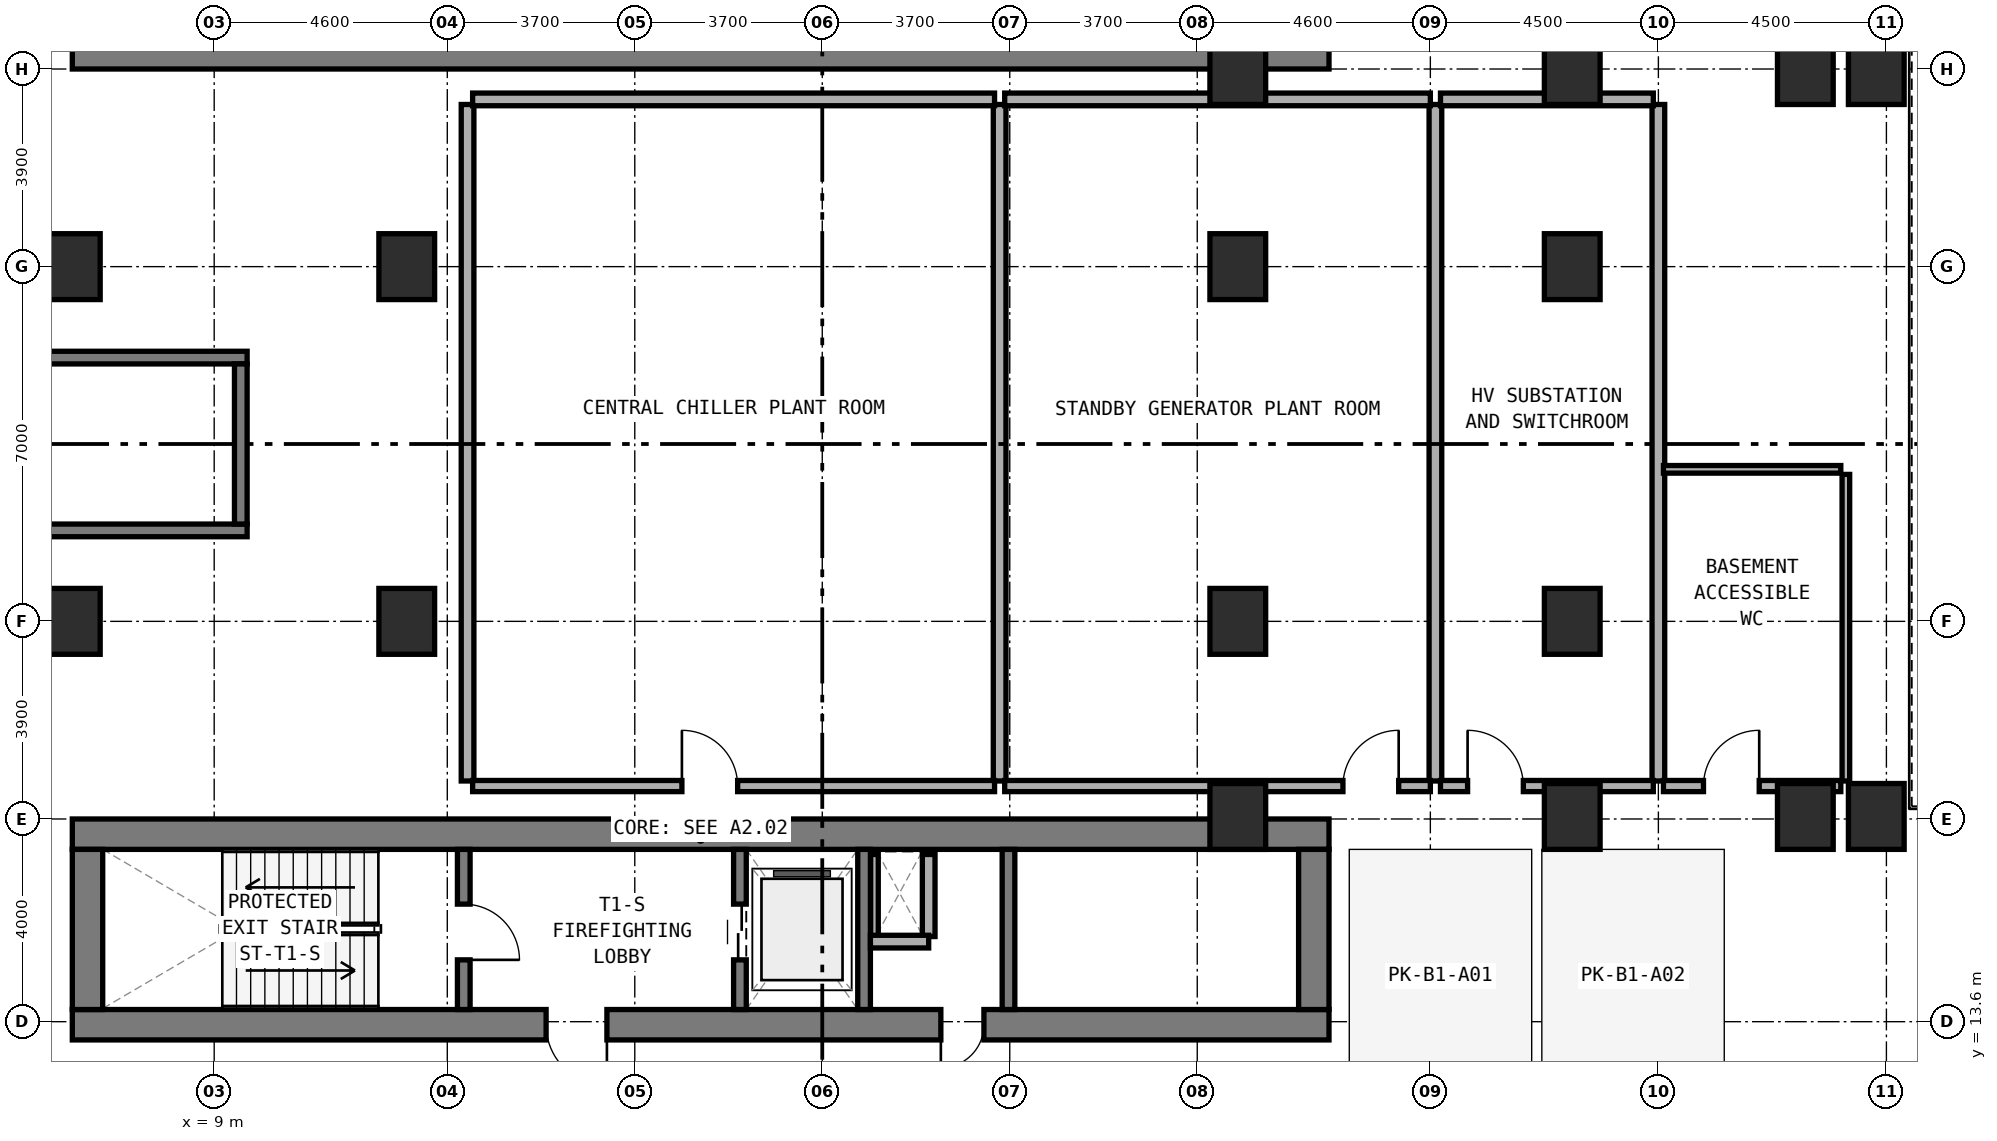
"""IFC4 building model, lengths in metres.
Left out: names, types, materials, properties, quantities, classifications, styles, units other than length and angle.
Written with IfcOpenShell. Run it as: python <this file> out.ifc"""

import sys

from ifc_helpers import new_model, si_unit, direction, frame, frame_2d, origin, origin_2d, place, context, subcontext, project, spatial, rectangle, extrude, element, fill, save


model = new_model("IFC4")
c1 = context("Model", 3, precision=1e-05, world=origin(), true_north=direction((0.0, 1.0)))
c2 = subcontext(c1, "Body", "Model", "MODEL_VIEW")
j1 = project(units=[si_unit("LENGTHUNIT", "METRE"), si_unit("PLANEANGLEUNIT", "RADIAN")], contexts=[c1])
p1 = place(None, origin())
s1 = spatial("IfcSite", under=j1, at=p1, CompositionType="ELEMENT")
p2 = place(p1, origin())
s2 = spatial("IfcBuilding", under=s1, at=p2, CompositionType="ELEMENT")
p3 = place(p2, frame((0.0, 0.0, -4.2)))
s3 = spatial("IfcBuildingStorey", under=s2, at=p3, CompositionType="ELEMENT", Elevation=-4.2)
p4 = place(p3, frame((6.2, 32.7, 0.0), z_axis=(0.0, 0.0, 1.0), x_axis=(1.0, 0.0, 0.0)))
e1 = element("IfcWall", 1, at=p4, inside=s3, PredefinedType="SHEAR", context=c2, shape_type="SweptSolid", body=[
    extrude(rectangle(XDim=24.8, YDim=0.6, at=frame_2d((12.4, 0.0))), origin(), (0.0, 0.0, 1.0), 4.2),
])
p5 = place(p3, frame((6.2, 13.54, 0.0), z_axis=(0.0, 0.0, 1.0), x_axis=(1.0, 0.0, 0.0)))
e2 = element("IfcWall", 2, at=p5, inside=s3, PredefinedType="SHEAR", context=c2, shape_type="SweptSolid", body=[
    extrude(rectangle(XDim=24.8, YDim=0.6, at=frame_2d((12.4, 0.0))), origin(), (0.0, 0.0, 1.0), 4.2),
])
p6 = place(p5, frame((9.35, 0.0, 0.0)))
e3 = element("IfcOpeningElement", 3, at=p6, cuts=e2, PredefinedType="OPENING", context=c2, shape_type="SweptSolid", body=[
    extrude(rectangle(XDim=1.2, YDim=2.15, at=frame_2d((0.6, 1.075))), frame((0.0, 0.31, 0.0), z_axis=(0.0, -1.0, 0.0), x_axis=(1.0, 0.0, 0.0)), (0.0, 0.0, 1.0), 0.62),
])
p7 = place(p5, frame((17.14, 0.0, 0.0)))
e4 = element("IfcOpeningElement", 4, at=p7, cuts=e2, PredefinedType="OPENING", context=c2, shape_type="SweptSolid", body=[
    extrude(rectangle(XDim=0.85, YDim=2.1, at=frame_2d((0.425, 1.05))), frame((0.0, 0.31, 0.0), z_axis=(0.0, -1.0, 0.0), x_axis=(1.0, 0.0, 0.0)), (0.0, 0.0, 1.0), 0.62),
])
p8 = place(p3, frame((6.2, 17.3, 0.0), z_axis=(0.0, 0.0, 1.0), x_axis=(1.0, 0.0, 0.0)))
e5 = element("IfcWall", 5, at=p8, inside=s3, PredefinedType="SHEAR", context=c2, shape_type="SweptSolid", body=[
    extrude(rectangle(XDim=24.8, YDim=0.6, at=frame_2d((12.4, 0.0))), origin(), (0.0, 0.0, 1.0), 4.2),
])
for number, where, z_axis, x_axis in (
    (6, (6.5, 13.84, 0.0), (0.0, 0.0, 1.0), (0.0, 1.0, 0.0)),
    (7, (30.7, 13.84, 0.0), (0.0, 0.0, 1.0), (0.0, 1.0, 0.0)),
):
    element("IfcWall", number, at=place(p3, frame(where, z_axis=z_axis, x_axis=x_axis)), inside=s3, PredefinedType="SHEAR", context=c2, shape_type="SweptSolid", body=[
        extrude(rectangle(XDim=3.16, YDim=0.6, at=frame_2d((1.58, 0.0))), origin(), (0.0, 0.0, 1.0), 4.2),
    ])
p9 = place(p3, frame((13.925, 13.84, 0.0), z_axis=(0.0, 0.0, 1.0), x_axis=(0.0, 1.0, 0.0)))
e8 = element("IfcWall", 8, at=p9, inside=s3, PredefinedType="STANDARD", context=c2, shape_type="SweptSolid", body=[
    extrude(rectangle(XDim=3.16, YDim=0.25, at=frame_2d((1.58, 0.0))), origin(), (0.0, 0.0, 1.0), 3.85),
])
p10 = place(p9, frame((0.98, 0.0, 0.0)))
e9 = element("IfcOpeningElement", 9, at=p10, cuts=e8, PredefinedType="OPENING", context=c2, shape_type="SweptSolid", body=[
    extrude(rectangle(XDim=1.1, YDim=2.15, at=frame_2d((0.55, 1.075))), frame((0.0, 0.135, 0.0), z_axis=(0.0, -1.0, 0.0), x_axis=(1.0, 0.0, 0.0)), (0.0, 0.0, 1.0), 0.27),
])
p11 = place(p3, frame((19.375, 13.84, 0.0), z_axis=(0.0, 0.0, 1.0), x_axis=(0.0, 1.0, 0.0)))
e10 = element("IfcWall", 10, at=p11, inside=s3, PredefinedType="STANDARD", context=c2, shape_type="SweptSolid", body=[
    extrude(rectangle(XDim=3.16, YDim=0.25, at=frame_2d((1.58, 0.0))), origin(), (0.0, 0.0, 1.0), 3.85),
])
p12 = place(p11, frame((0.98, 0.0, 0.0)))
e11 = element("IfcOpeningElement", 11, at=p12, cuts=e10, PredefinedType="OPENING", context=c2, shape_type="SweptSolid", body=[
    extrude(rectangle(XDim=1.1, YDim=2.15, at=frame_2d((0.55, 1.075))), frame((0.0, 0.135, 0.0), z_axis=(0.0, -1.0, 0.0), x_axis=(1.0, 0.0, 0.0)), (0.0, 0.0, 1.0), 0.27),
])
for number, where, z_axis, x_axis in (
    (12, (21.825, 13.84, 0.0), (0.0, 0.0, 1.0), (0.0, 1.0, 0.0)),
    (13, (24.675, 13.84, 0.0), (0.0, 0.0, 1.0), (0.0, 1.0, 0.0)),
):
    element("IfcWall", number, at=place(p3, frame(where, z_axis=z_axis, x_axis=x_axis)), inside=s3, PredefinedType="STANDARD", context=c2, shape_type="SweptSolid", body=[
        extrude(rectangle(XDim=3.16, YDim=0.25, at=frame_2d((1.58, 0.0))), origin(), (0.0, 0.0, 1.0), 3.85),
    ])
for number, where, z_axis, x_axis in (
    (14, (2.15, 23.295, 0.0), (0.0, 0.0, 1.0), (1.0, 0.0, 0.0)),
    (15, (2.15, 26.705, 0.0), (0.0, 0.0, 1.0), (1.0, 0.0, 0.0)),
):
    element("IfcWall", number, at=place(p3, frame(where, z_axis=z_axis, x_axis=x_axis)), inside=s3, PredefinedType="STANDARD", context=c2, shape_type="SweptSolid", body=[
        extrude(rectangle(XDim=7.5, YDim=0.25, at=frame_2d((3.75, 0.0))), origin(), (0.0, 0.0, 1.0), 4.2),
    ])
p13 = place(p3, frame((9.525, 23.42, 0.0), z_axis=(0.0, 0.0, 1.0), x_axis=(0.0, 1.0, 0.0)))
e16 = element("IfcWall", 16, at=p13, inside=s3, PredefinedType="STANDARD", context=c2, shape_type="SweptSolid", body=[
    extrude(rectangle(XDim=3.16, YDim=0.25, at=frame_2d((1.58, 0.0))), origin(), (0.0, 0.0, 1.0), 4.2),
])
for number, where, z_axis, x_axis in (
    (17, (6.2, 21.5, 0.0), (0.0, 0.0, 1.0), (1.0, 0.0, 0.0)),
    (18, (6.2, 28.5, 0.0), (0.0, 0.0, 1.0), (1.0, 0.0, 0.0)),
    (19, (35.8, 21.5, 0.0), (0.0, 0.0, 1.0), (1.0, 0.0, 0.0)),
    (20, (35.8, 28.5, 0.0), (0.0, 0.0, 1.0), (1.0, 0.0, 0.0)),
    (21, (35.8, 17.65, 0.0), (0.0, 0.0, 1.0), (1.0, 0.0, 0.0)),
    (22, (35.8, 32.35, 0.0), (0.0, 0.0, 1.0), (1.0, 0.0, 0.0)),
    (23, (12.8, 21.5, 0.0), (0.0, 0.0, 1.0), (1.0, 0.0, 0.0)),
    (24, (12.8, 28.5, 0.0), (0.0, 0.0, 1.0), (1.0, 0.0, 0.0)),
    (25, (29.2, 17.65, 0.0), (0.0, 0.0, 1.0), (1.0, 0.0, 0.0)),
    (26, (29.2, 32.35, 0.0), (0.0, 0.0, 1.0), (1.0, 0.0, 0.0)),
    (27, (29.2, 21.5, 0.0), (0.0, 0.0, 1.0), (1.0, 0.0, 0.0)),
    (28, (29.2, 28.5, 0.0), (0.0, 0.0, 1.0), (1.0, 0.0, 0.0)),
    (29, (40.4, 17.65, 0.0), (0.0, 0.0, 1.0), (1.0, 0.0, 0.0)),
    (30, (40.4, 32.35, 0.0), (0.0, 0.0, 1.0), (1.0, 0.0, 0.0)),
    (31, (41.8, 17.65, 0.0), (0.0, 0.0, 1.0), (1.0, 0.0, 0.0)),
    (32, (41.8, 32.35, 0.0), (0.0, 0.0, 1.0), (1.0, 0.0, 0.0)),
):
    element("IfcColumn", number, at=place(p3, frame(where, z_axis=z_axis, x_axis=x_axis)), inside=s3, PredefinedType="COLUMN", context=c2, shape_type="SweptSolid", body=[
        extrude(rectangle(XDim=1.1, YDim=1.3, at=origin_2d()), origin(), (0.0, 0.0, 1.0), 4.2),
    ])
p14 = place(p3, frame((22.03, 15.28, 0.0), z_axis=(0.0, 0.0, 1.0), x_axis=(0.0, 1.0, 0.0)))
e33 = element("IfcWall", 33, at=p14, inside=s3, PredefinedType="PARTITIONING", context=c2, shape_type="SweptSolid", body=[
    extrude(rectangle(XDim=1.62, YDim=0.15, at=frame_2d((0.81, 0.0))), origin(), (0.0, 0.0, 1.0), 3.85),
])
p15 = place(p3, frame((23.1, 15.28, 0.0), z_axis=(0.0, 0.0, 1.0), x_axis=(0.0, 1.0, 0.0)))
e34 = element("IfcWall", 34, at=p15, inside=s3, PredefinedType="SOLIDWALL", context=c2, shape_type="SweptSolid", body=[
    extrude(rectangle(XDim=1.62, YDim=0.25, at=frame_2d((0.81, 0.0))), origin(), (0.0, 0.0, 1.0), 3.85),
])
p16 = place(p3, frame((21.95, 15.18, 0.0), z_axis=(0.0, 0.0, 1.0), x_axis=(1.0, 0.0, 0.0)))
e35 = element("IfcWall", 35, at=p16, inside=s3, PredefinedType="SOLIDWALL", context=c2, shape_type="SweptSolid", body=[
    extrude(rectangle(XDim=1.15, YDim=0.25, at=frame_2d((0.575, 0.0))), origin(), (0.0, 0.0, 1.0), 3.85),
])
for number, where, z_axis, x_axis in (
    (36, (14.0, 18.35, 0.0), (0.0, 0.0, 1.0), (0.0, 1.0, 0.0)),
    (37, (24.5, 18.35, 0.0), (0.0, 0.0, 1.0), (0.0, 1.0, 0.0)),
):
    element("IfcWall", number, at=place(p3, frame(where, z_axis=z_axis, x_axis=x_axis)), inside=s3, PredefinedType="SOLIDWALL", context=c2, shape_type="SweptSolid", body=[
        extrude(rectangle(XDim=13.35, YDim=0.25, at=frame_2d((6.675, 0.0))), origin(), (0.0, 0.0, 1.0), 3.85),
    ])
p17 = place(p3, frame((14.1, 31.8, 0.0), z_axis=(0.0, 0.0, 1.0), x_axis=(1.0, 0.0, 0.0)))
e38 = element("IfcWall", 38, at=p17, inside=s3, PredefinedType="SOLIDWALL", context=c2, shape_type="SweptSolid", body=[
    extrude(rectangle(XDim=10.3, YDim=0.25, at=frame_2d((5.15, 0.0))), origin(), (0.0, 0.0, 1.0), 3.85),
])
p18 = place(p3, frame((14.1, 18.25, 0.0), z_axis=(0.0, 0.0, 1.0), x_axis=(1.0, 0.0, 0.0)))
e39 = element("IfcWall", 39, at=p18, inside=s3, PredefinedType="SOLIDWALL", context=c2, shape_type="SweptSolid", body=[
    extrude(rectangle(XDim=10.3, YDim=0.22, at=frame_2d((5.15, 0.0))), origin(), (0.0, 0.0, 1.0), 3.85),
])
p19 = place(p18, frame((4.13, 0.0, 0.0)))
e40 = element("IfcOpeningElement", 40, at=p19, cuts=e39, PredefinedType="OPENING", context=c2, shape_type="SweptSolid", body=[
    extrude(rectangle(XDim=1.1, YDim=2.1, at=frame_2d((0.55, 1.05))), frame((0.0, 0.12, 0.0), z_axis=(0.0, -1.0, 0.0), x_axis=(1.0, 0.0, 0.0)), (0.0, 0.0, 1.0), 0.24),
])
p20 = place(p3, frame((33.1, 18.35, 0.0), z_axis=(0.0, 0.0, 1.0), x_axis=(0.0, 1.0, 0.0)))
e41 = element("IfcWall", 41, at=p20, inside=s3, PredefinedType="SOLIDWALL", context=c2, shape_type="SweptSolid", body=[
    extrude(rectangle(XDim=13.35, YDim=0.25, at=frame_2d((6.675, 0.0))), origin(), (0.0, 0.0, 1.0), 3.85),
])
p21 = place(p3, frame((24.6, 31.8, 0.0), z_axis=(0.0, 0.0, 1.0), x_axis=(1.0, 0.0, 0.0)))
e42 = element("IfcWall", 42, at=p21, inside=s3, PredefinedType="SOLIDWALL", context=c2, shape_type="SweptSolid", body=[
    extrude(rectangle(XDim=8.4, YDim=0.25, at=frame_2d((4.2, 0.0))), origin(), (0.0, 0.0, 1.0), 3.125),
])
p22 = place(p3, frame((24.6, 18.25, 0.0), z_axis=(0.0, 0.0, 1.0), x_axis=(1.0, 0.0, 0.0)))
e43 = element("IfcWall", 43, at=p22, inside=s3, PredefinedType="SOLIDWALL", context=c2, shape_type="SweptSolid", body=[
    extrude(rectangle(XDim=8.4, YDim=0.22, at=frame_2d((4.2, 0.0))), origin(), (0.0, 0.0, 1.0), 3.125),
])
p23 = place(p22, frame((6.675, 0.0, 0.0)))
e44 = element("IfcOpeningElement", 44, at=p23, cuts=e43, PredefinedType="OPENING", context=c2, shape_type="SweptSolid", body=[
    extrude(rectangle(XDim=1.1, YDim=2.1, at=frame_2d((0.55, 1.05))), frame((0.0, 0.12, 0.0), z_axis=(0.0, -1.0, 0.0), x_axis=(1.0, 0.0, 0.0)), (0.0, 0.0, 1.0), 0.24),
])
p24 = place(p3, frame((37.5, 18.35, 0.0), z_axis=(0.0, 0.0, 1.0), x_axis=(0.0, 1.0, 0.0)))
e45 = element("IfcWall", 45, at=p24, inside=s3, PredefinedType="SOLIDWALL", context=c2, shape_type="SweptSolid", body=[
    extrude(rectangle(XDim=13.35, YDim=0.25, at=frame_2d((6.675, 0.0))), origin(), (0.0, 0.0, 1.0), 3.85),
])
p25 = place(p3, frame((33.2, 31.8, 0.0), z_axis=(0.0, 0.0, 1.0), x_axis=(1.0, 0.0, 0.0)))
e46 = element("IfcWall", 46, at=p25, inside=s3, PredefinedType="SOLIDWALL", context=c2, shape_type="SweptSolid", body=[
    extrude(rectangle(XDim=4.2, YDim=0.25, at=frame_2d((2.1, 0.0))), origin(), (0.0, 0.0, 1.0), 3.375),
])
p26 = place(p3, frame((33.2, 18.25, 0.0), z_axis=(0.0, 0.0, 1.0), x_axis=(1.0, 0.0, 0.0)))
e47 = element("IfcWall", 47, at=p26, inside=s3, PredefinedType="SOLIDWALL", context=c2, shape_type="SweptSolid", body=[
    extrude(rectangle(XDim=4.2, YDim=0.22, at=frame_2d((2.1, 0.0))), origin(), (0.0, 0.0, 1.0), 3.375),
])
p27 = place(p26, frame((0.535, 0.0, 0.0)))
e48 = element("IfcOpeningElement", 48, at=p27, cuts=e47, PredefinedType="OPENING", context=c2, shape_type="SweptSolid", body=[
    extrude(rectangle(XDim=1.1, YDim=2.1, at=frame_2d((0.55, 1.05))), frame((0.0, 0.12, 0.0), z_axis=(0.0, -1.0, 0.0), x_axis=(1.0, 0.0, 0.0)), (0.0, 0.0, 1.0), 0.24),
])
p28 = place(p3, frame((41.2, 18.35, 0.0), z_axis=(0.0, 0.0, 1.0), x_axis=(0.0, 1.0, 0.0)))
e49 = element("IfcWall", 49, at=p28, inside=s3, PredefinedType="PARTITIONING", context=c2, shape_type="SweptSolid", body=[
    extrude(rectangle(XDim=6.05, YDim=0.15, at=frame_2d((3.025, 0.0))), origin(), (0.0, 0.0, 1.0), 3.85),
])
p29 = place(p3, frame((37.6, 24.5, 0.0), z_axis=(0.0, 0.0, 1.0), x_axis=(1.0, 0.0, 0.0)))
e50 = element("IfcWall", 50, at=p29, inside=s3, PredefinedType="PARTITIONING", context=c2, shape_type="SweptSolid", body=[
    extrude(rectangle(XDim=3.5, YDim=0.15, at=frame_2d((1.75, 0.0))), origin(), (0.0, 0.0, 1.0), 3.125),
])
p30 = place(p3, frame((37.6, 18.25, 0.0), z_axis=(0.0, 0.0, 1.0), x_axis=(1.0, 0.0, 0.0)))
e51 = element("IfcWall", 51, at=p30, inside=s3, PredefinedType="SOLIDWALL", context=c2, shape_type="SweptSolid", body=[
    extrude(rectangle(XDim=3.5, YDim=0.22, at=frame_2d((1.75, 0.0))), origin(), (0.0, 0.0, 1.0), 3.125),
])
p31 = place(p30, frame((0.79, 0.0, 0.0)))
e52 = element("IfcOpeningElement", 52, at=p31, cuts=e51, PredefinedType="OPENING", context=c2, shape_type="SweptSolid", body=[
    extrude(rectangle(XDim=1.1, YDim=2.1, at=frame_2d((0.55, 1.05))), frame((0.0, 0.12, 0.0), z_axis=(0.0, -1.0, 0.0), x_axis=(1.0, 0.0, 0.0)), (0.0, 0.0, 1.0), 0.24),
])
p32 = place(p10, frame((1.1, 0.0, 0.0), z_axis=(0.0, 0.0, 1.0), x_axis=(-1.0, 0.0, 0.0)))
e53 = element("IfcDoor", 53, at=p32, inside=s3, OperationType="SINGLE_SWING_RIGHT", PredefinedType="DOOR", context=c2, shape_type="SweptSolid", body=[
    extrude(rectangle(XDim=1.1, YDim=2.15, at=frame_2d((0.55, 1.075))), frame((0.0, 0.025, 0.0), z_axis=(0.0, -1.0, 0.0), x_axis=(1.0, 0.0, 0.0)), (0.0, 0.0, 1.0), 0.05),
])
fill(e9, e53)
p33 = place(p6, frame((1.2, 0.0, 0.0), z_axis=(0.0, 0.0, 1.0), x_axis=(-1.0, 0.0, 0.0)))
e54 = element("IfcDoor", 54, at=p33, inside=s3, OperationType="SINGLE_SWING_LEFT", PredefinedType="DOOR", context=c2, shape_type="SweptSolid", body=[
    extrude(rectangle(XDim=1.2, YDim=2.15, at=frame_2d((0.6, 1.075))), frame((0.0, 0.025, 0.0), z_axis=(0.0, -1.0, 0.0), x_axis=(1.0, 0.0, 0.0)), (0.0, 0.0, 1.0), 0.05),
])
fill(e3, e54)
p34 = place(p12, origin())
e55 = element("IfcDoor", 55, at=p34, inside=s3, OperationType="DOUBLE_DOOR_SLIDING", PredefinedType="DOOR", context=c2, shape_type="SweptSolid", body=[
    extrude(rectangle(XDim=1.1, YDim=2.15, at=frame_2d((0.55, 1.075))), frame((0.0, 0.025, 0.0), z_axis=(0.0, -1.0, 0.0), x_axis=(1.0, 0.0, 0.0)), (0.0, 0.0, 1.0), 0.05),
])
fill(e11, e55)
p35 = place(p7, frame((0.85, 0.0, 0.0), z_axis=(0.0, 0.0, 1.0), x_axis=(-1.0, 0.0, 0.0)))
e56 = element("IfcDoor", 56, at=p35, inside=s3, OperationType="SINGLE_SWING_RIGHT", PredefinedType="DOOR", context=c2, shape_type="SweptSolid", body=[
    extrude(rectangle(XDim=0.85, YDim=2.1, at=frame_2d((0.425, 1.05))), frame((0.0, 0.025, 0.0), z_axis=(0.0, -1.0, 0.0), x_axis=(1.0, 0.0, 0.0)), (0.0, 0.0, 1.0), 0.05),
])
fill(e4, e56)
p36 = place(p19, origin())
e57 = element("IfcDoor", 57, at=p36, inside=s3, OperationType="SINGLE_SWING_LEFT", PredefinedType="DOOR", context=c2, shape_type="SweptSolid", body=[
    extrude(rectangle(XDim=1.1, YDim=2.1, at=frame_2d((0.55, 1.05))), frame((0.0, 0.025, 0.0), z_axis=(0.0, -1.0, 0.0), x_axis=(1.0, 0.0, 0.0)), (0.0, 0.0, 1.0), 0.05),
])
fill(e40, e57)
p37 = place(p23, origin())
e58 = element("IfcDoor", 58, at=p37, inside=s3, OperationType="SINGLE_SWING_RIGHT", PredefinedType="DOOR", context=c2, shape_type="SweptSolid", body=[
    extrude(rectangle(XDim=1.1, YDim=2.1, at=frame_2d((0.55, 1.05))), frame((0.0, 0.025, 0.0), z_axis=(0.0, -1.0, 0.0), x_axis=(1.0, 0.0, 0.0)), (0.0, 0.0, 1.0), 0.05),
])
fill(e44, e58)
p38 = place(p27, origin())
e59 = element("IfcDoor", 59, at=p38, inside=s3, OperationType="SINGLE_SWING_LEFT", PredefinedType="DOOR", context=c2, shape_type="SweptSolid", body=[
    extrude(rectangle(XDim=1.1, YDim=2.1, at=frame_2d((0.55, 1.05))), frame((0.0, 0.025, 0.0), z_axis=(0.0, -1.0, 0.0), x_axis=(1.0, 0.0, 0.0)), (0.0, 0.0, 1.0), 0.05),
])
fill(e48, e59)
p39 = place(p31, origin())
e60 = element("IfcDoor", 60, at=p39, inside=s3, OperationType="SINGLE_SWING_RIGHT", PredefinedType="DOOR", context=c2, shape_type="SweptSolid", body=[
    extrude(rectangle(XDim=1.1, YDim=2.1, at=frame_2d((0.55, 1.05))), frame((0.0, 0.025, 0.0), z_axis=(0.0, -1.0, 0.0), x_axis=(1.0, 0.0, 0.0)), (0.0, 0.0, 1.0), 0.05),
])
fill(e52, e60)
save(model, sys.argv[1])
